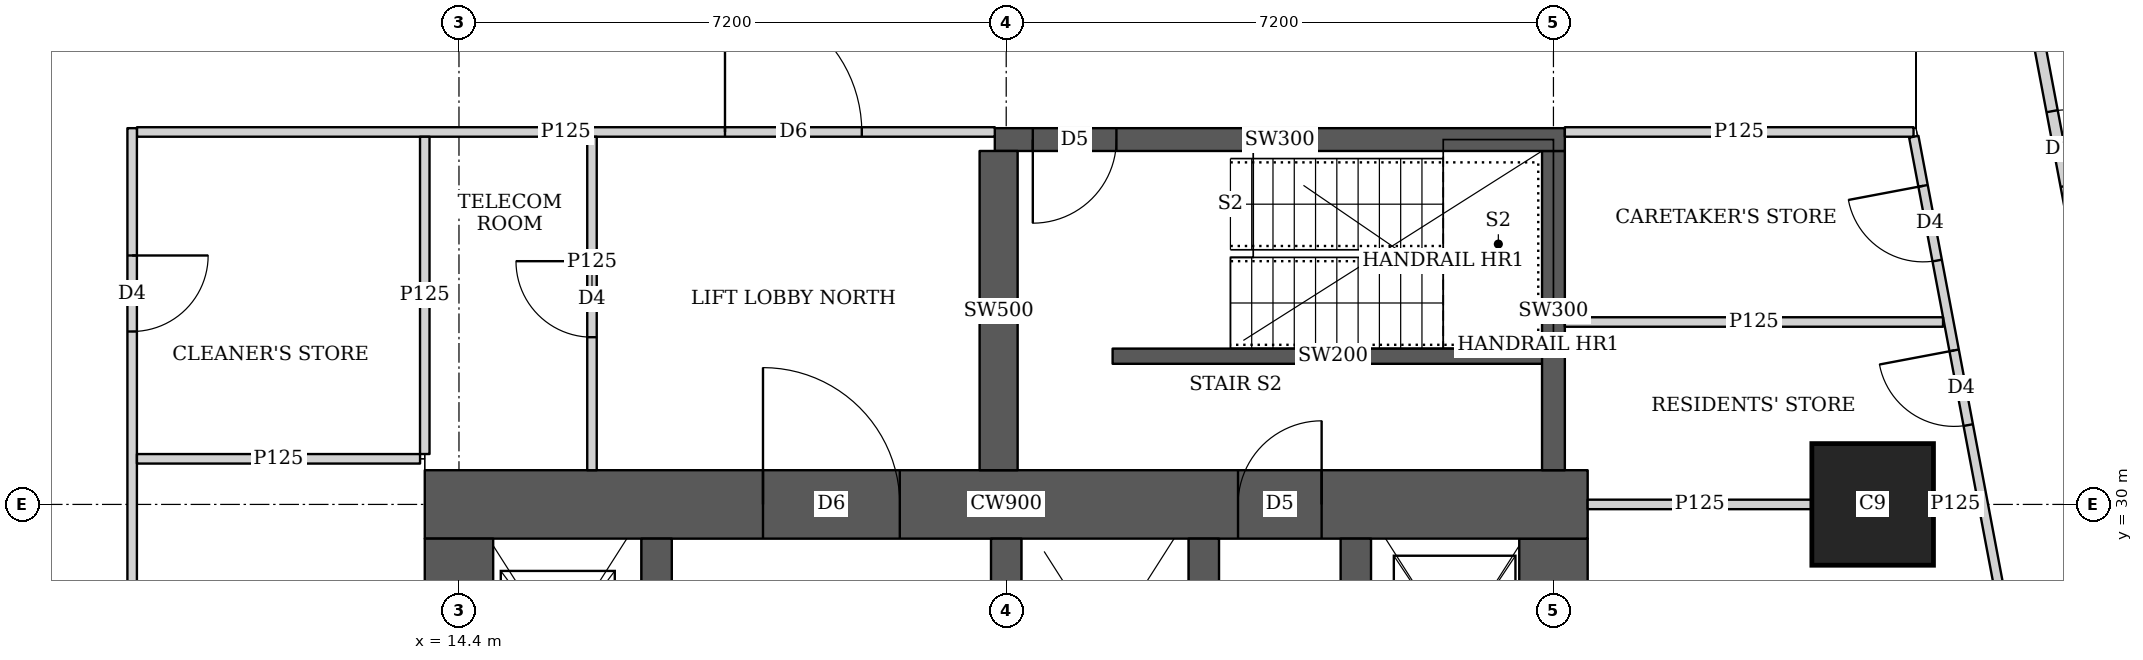
"""IFC4 building model, lengths in metres.
Left out: names, types, materials, properties, quantities, classifications, styles, units other than length and angle.
Written with IfcOpenShell. Run it as: python <this file> out.ifc"""

import sys

from ifc_helpers import new_model, si_unit, direction, frame, frame_2d, origin, origin_2d, place, context, subcontext, project, spatial, rectangle, extrude, element, fill, save


model = new_model("IFC4")
c1 = context("Model", 3, precision=1e-05, world=origin(), true_north=direction((0.0, 1.0)))
c2 = subcontext(c1, "Body", "Model", "MODEL_VIEW")
j1 = project(units=[si_unit("LENGTHUNIT", "METRE"), si_unit("PLANEANGLEUNIT", "RADIAN")], contexts=[c1])
p1 = place(None, origin())
s1 = spatial("IfcSite", under=j1, at=p1, CompositionType="ELEMENT")
p2 = place(p1, origin())
s2 = spatial("IfcBuilding", under=s1, at=p2, CompositionType="ELEMENT")
p3 = place(p2, frame((0.0, 0.0, 122.9)))
s3 = spatial("IfcBuildingStorey", under=s2, at=p3, CompositionType="ELEMENT", Elevation=122.9)
p4 = place(p3, frame((33.0, 30.0, 0.0), z_axis=(0.0, 0.0, 1.0), x_axis=(1.0, 0.0, 0.0)))
e1 = element("IfcColumn", 1, at=p4, inside=s3, PredefinedType="COLUMN", context=c2, shape_type="SweptSolid", body=[
    extrude(rectangle(XDim=1.6, YDim=1.6, at=origin_2d()), origin(), (0.0, 0.0, 1.0), 3.75),
])
p5 = place(p3, frame((13.95, 30.0, 0.0), z_axis=(0.0, 0.0, 1.0), x_axis=(1.0, 0.0, 0.0)))
e2 = element("IfcWall", 2, at=p5, inside=s3, PredefinedType="SHEAR", context=c2, shape_type="SweptSolid", body=[
    extrude(rectangle(XDim=15.3, YDim=0.9, at=frame_2d((7.65, 0.0))), origin(), (0.0, 0.0, 1.0), 3.75),
])
p6 = place(p5, frame((4.45, 0.0, 0.0)))
e3 = element("IfcOpeningElement", 3, at=p6, cuts=e2, PredefinedType="OPENING", context=c2, shape_type="SweptSolid", body=[
    extrude(rectangle(XDim=1.8, YDim=2.1, at=frame_2d((0.9, 1.05))), frame((0.0, 0.46, 0.0), z_axis=(0.0, -1.0, 0.0), x_axis=(1.0, 0.0, 0.0)), (0.0, 0.0, 1.0), 0.92),
])
p7 = place(p5, frame((10.7, 0.0, 0.0)))
e4 = element("IfcOpeningElement", 4, at=p7, cuts=e2, PredefinedType="OPENING", context=c2, shape_type="SweptSolid", body=[
    extrude(rectangle(XDim=1.1, YDim=2.1, at=frame_2d((0.55, 1.05))), frame((0.0, 0.46, 0.0), z_axis=(0.0, -1.0, 0.0), x_axis=(1.0, 0.0, 0.0)), (0.0, 0.0, 1.0), 0.92),
])
for number, where, z_axis, x_axis in (
    (5, (14.4, 15.45, 0.0), (0.0, 0.0, 1.0), (0.0, 1.0, 0.0)),
    (6, (28.8, 15.45, 0.0), (0.0, 0.0, 1.0), (0.0, 1.0, 0.0)),
):
    element("IfcWall", number, at=place(p3, frame(where, z_axis=z_axis, x_axis=x_axis)), inside=s3, PredefinedType="SHEAR", context=c2, shape_type="SweptSolid", body=[
        extrude(rectangle(XDim=14.1, YDim=0.9, at=frame_2d((7.05, 0.0))), origin(), (0.0, 0.0, 1.0), 3.75),
    ])
p8 = place(p3, frame((17.0, 15.45, 0.0), z_axis=(0.0, 0.0, 1.0), x_axis=(0.0, 1.0, 0.0)))
e7 = element("IfcWall", 7, at=p8, inside=s3, PredefinedType="SHEAR", context=c2, shape_type="SweptSolid", body=[
    extrude(rectangle(XDim=14.1, YDim=0.4, at=frame_2d((7.05, 0.0))), origin(), (0.0, 0.0, 1.0), 3.75),
])
p9 = place(p8, frame((0.875, 0.0, 0.0)))
e8 = element("IfcOpeningElement", 8, at=p9, cuts=e7, PredefinedType="OPENING", context=c2, shape_type="SweptSolid", body=[
    extrude(rectangle(XDim=1.1, YDim=2.1, at=frame_2d((0.55, 1.05))), frame((0.0, 0.21, 0.0), z_axis=(0.0, -1.0, 0.0), x_axis=(1.0, 0.0, 0.0)), (0.0, 0.0, 1.0), 0.42),
])
p10 = place(p8, frame((4.625, 0.0, 0.0)))
e9 = element("IfcOpeningElement", 9, at=p10, cuts=e7, PredefinedType="OPENING", context=c2, shape_type="SweptSolid", body=[
    extrude(rectangle(XDim=1.1, YDim=2.1, at=frame_2d((0.55, 1.05))), frame((0.0, 0.21, 0.0), z_axis=(0.0, -1.0, 0.0), x_axis=(1.0, 0.0, 0.0)), (0.0, 0.0, 1.0), 0.42),
])
p11 = place(p8, frame((8.375, 0.0, 0.0)))
e10 = element("IfcOpeningElement", 10, at=p11, cuts=e7, PredefinedType="OPENING", context=c2, shape_type="SweptSolid", body=[
    extrude(rectangle(XDim=1.1, YDim=2.1, at=frame_2d((0.55, 1.05))), frame((0.0, 0.21, 0.0), z_axis=(0.0, -1.0, 0.0), x_axis=(1.0, 0.0, 0.0)), (0.0, 0.0, 1.0), 0.42),
])
p12 = place(p8, frame((12.125, 0.0, 0.0)))
e11 = element("IfcOpeningElement", 11, at=p12, cuts=e7, PredefinedType="OPENING", context=c2, shape_type="SweptSolid", body=[
    extrude(rectangle(XDim=1.1, YDim=2.1, at=frame_2d((0.55, 1.05))), frame((0.0, 0.21, 0.0), z_axis=(0.0, -1.0, 0.0), x_axis=(1.0, 0.0, 0.0)), (0.0, 0.0, 1.0), 0.42),
])
for number, where, z_axis, x_axis in (
    (12, (21.6, 15.45, 0.0), (0.0, 0.0, 1.0), (0.0, 1.0, 0.0)),
    (13, (24.2, 15.45, 0.0), (0.0, 0.0, 1.0), (0.0, 1.0, 0.0)),
):
    element("IfcWall", number, at=place(p3, frame(where, z_axis=z_axis, x_axis=x_axis)), inside=s3, PredefinedType="SHEAR", context=c2, shape_type="SweptSolid", body=[
        extrude(rectangle(XDim=14.1, YDim=0.4, at=frame_2d((7.05, 0.0))), origin(), (0.0, 0.0, 1.0), 3.75),
    ])
p13 = place(p3, frame((26.2, 26.45, 0.0), z_axis=(0.0, 0.0, 1.0), x_axis=(0.0, 1.0, 0.0)))
e14 = element("IfcWall", 14, at=p13, inside=s3, PredefinedType="SHEAR", context=c2, shape_type="SweptSolid", body=[
    extrude(rectangle(XDim=3.1, YDim=0.4, at=frame_2d((1.55, 0.0))), origin(), (0.0, 0.0, 1.0), 3.75),
])
p14 = place(p13, frame((1.075, 0.0, 0.0)))
e15 = element("IfcOpeningElement", 15, at=p14, cuts=e14, PredefinedType="OPENING", context=c2, shape_type="SweptSolid", body=[
    extrude(rectangle(XDim=1.2, YDim=2.1, at=frame_2d((0.6, 1.05))), frame((0.0, 0.21, 0.0), z_axis=(0.0, -1.0, 0.0), x_axis=(1.0, 0.0, 0.0)), (0.0, 0.0, 1.0), 0.42),
])
p15 = place(p3, frame((21.45, 34.8, 0.0), z_axis=(0.0, 0.0, 1.0), x_axis=(1.0, 0.0, 0.0)))
e16 = element("IfcWall", 16, at=p15, inside=s3, PredefinedType="SHEAR", context=c2, shape_type="SweptSolid", body=[
    extrude(rectangle(XDim=7.5, YDim=0.3, at=frame_2d((3.75, 0.0))), origin(), (0.0, 0.0, 1.0), 3.75),
])
p16 = place(p15, frame((0.5, 0.0, 0.0)))
e17 = element("IfcOpeningElement", 17, at=p16, cuts=e16, PredefinedType="OPENING", context=c2, shape_type="SweptSolid", body=[
    extrude(rectangle(XDim=1.1, YDim=2.1, at=frame_2d((0.55, 1.05))), frame((0.0, 0.16, 0.0), z_axis=(0.0, -1.0, 0.0), x_axis=(1.0, 0.0, 0.0)), (0.0, 0.0, 1.0), 0.32),
])
p17 = place(p3, frame((21.5, 30.45, 0.0), z_axis=(0.0, 0.0, 1.0), x_axis=(0.0, 1.0, 0.0)))
e18 = element("IfcWall", 18, at=p17, inside=s3, PredefinedType="SHEAR", context=c2, shape_type="SweptSolid", body=[
    extrude(rectangle(XDim=4.2, YDim=0.5, at=frame_2d((2.1, 0.0))), origin(), (0.0, 0.0, 1.0), 3.75),
])
p18 = place(p3, frame((28.8, 30.45, 0.0), z_axis=(0.0, 0.0, 1.0), x_axis=(0.0, 1.0, 0.0)))
e19 = element("IfcWall", 19, at=p18, inside=s3, PredefinedType="SHEAR", context=c2, shape_type="SweptSolid", body=[
    extrude(rectangle(XDim=4.2, YDim=0.3, at=frame_2d((2.1, 0.0))), origin(), (0.0, 0.0, 1.0), 3.75),
])
p19 = place(p3, frame((33.382, 45.65, 0.0), z_axis=(0.0, 0.0, 1.0), x_axis=(0.185593544777, -0.982626600565, 0.0)))
e20 = element("IfcWall", 20, at=p19, inside=s3, PredefinedType="SOLIDWALL", context=c2, shape_type="SweptSolid", body=[
    extrude(rectangle(XDim=47.118, YDim=0.15, at=frame_2d((23.559, 0.0))), origin(), (0.0, 0.0, 1.0), 2.2),
])
p20 = place(p19, frame((10.662, 0.0, 0.0)))
e21 = element("IfcOpeningElement", 21, at=p20, cuts=e20, PredefinedType="OPENING", context=c2, shape_type="SweptSolid", body=[
    extrude(rectangle(XDim=1.0, YDim=2.1, at=frame_2d((0.5, 1.05))), frame((0.0, 0.085, 0.0), z_axis=(0.0, -1.0, 0.0), x_axis=(1.0, 0.0, 0.0)), (0.0, 0.0, 1.0), 0.17),
])
p21 = place(p19, frame((15.237, 0.0, 0.0)))
e22 = element("IfcOpeningElement", 22, at=p21, cuts=e20, PredefinedType="OPENING", context=c2, shape_type="SweptSolid", body=[
    extrude(rectangle(XDim=1.0, YDim=2.1, at=frame_2d((0.5, 1.05))), frame((0.0, 0.085, 0.0), z_axis=(0.0, -1.0, 0.0), x_axis=(1.0, 0.0, 0.0)), (0.0, 0.0, 1.0), 0.17),
])
p22 = place(p19, frame((22.87, 0.0, 0.0)))
e23 = element("IfcOpeningElement", 23, at=p22, cuts=e20, PredefinedType="OPENING", context=c2, shape_type="SweptSolid", body=[
    extrude(rectangle(XDim=1.0, YDim=2.1, at=frame_2d((0.5, 1.05))), frame((0.0, 0.085, 0.0), z_axis=(0.0, -1.0, 0.0), x_axis=(1.0, 0.0, 0.0)), (0.0, 0.0, 1.0), 0.17),
])
p23 = place(p19, frame((33.833, 0.0, 0.0)))
e24 = element("IfcOpeningElement", 24, at=p23, cuts=e20, PredefinedType="OPENING", context=c2, shape_type="SweptSolid", body=[
    extrude(rectangle(XDim=1.0, YDim=2.1, at=frame_2d((0.5, 1.05))), frame((0.0, 0.085, 0.0), z_axis=(0.0, -1.0, 0.0), x_axis=(1.0, 0.0, 0.0)), (0.0, 0.0, 1.0), 0.17),
])
p24 = place(p3, frame((10.1, 10.05, 0.0), z_axis=(0.0, 0.0, 1.0), x_axis=(0.0, 1.0, 0.0)))
e25 = element("IfcWall", 25, at=p24, inside=s3, PredefinedType="PARTITIONING", context=c2, shape_type="SweptSolid", body=[
    extrude(rectangle(XDim=24.9, YDim=0.125, at=frame_2d((12.45, 0.0))), origin(), (0.0, 0.0, 1.0), 3.5),
])
p25 = place(p24, frame((1.675, 0.0, 0.0)))
e26 = element("IfcOpeningElement", 26, at=p25, cuts=e25, PredefinedType="OPENING", context=c2, shape_type="SweptSolid", body=[
    extrude(rectangle(XDim=1.0, YDim=2.1, at=frame_2d((0.5, 1.05))), frame((0.0, 0.073, 0.0), z_axis=(0.0, -1.0, 0.0), x_axis=(1.0, 0.0, 0.0)), (0.0, 0.0, 1.0), 0.145),
])
p26 = place(p24, frame((7.9, 0.0, 0.0)))
e27 = element("IfcOpeningElement", 27, at=p26, cuts=e25, PredefinedType="OPENING", context=c2, shape_type="SweptSolid", body=[
    extrude(rectangle(XDim=1.0, YDim=2.1, at=frame_2d((0.5, 1.05))), frame((0.0, 0.073, 0.0), z_axis=(0.0, -1.0, 0.0), x_axis=(1.0, 0.0, 0.0)), (0.0, 0.0, 1.0), 0.145),
])
p27 = place(p24, frame((16.0, 0.0, 0.0)))
e28 = element("IfcOpeningElement", 28, at=p27, cuts=e25, PredefinedType="OPENING", context=c2, shape_type="SweptSolid", body=[
    extrude(rectangle(XDim=1.0, YDim=2.1, at=frame_2d((0.5, 1.05))), frame((0.0, 0.073, 0.0), z_axis=(0.0, -1.0, 0.0), x_axis=(1.0, 0.0, 0.0)), (0.0, 0.0, 1.0), 0.145),
])
p28 = place(p24, frame((22.225, 0.0, 0.0)))
e29 = element("IfcOpeningElement", 29, at=p28, cuts=e25, PredefinedType="OPENING", context=c2, shape_type="SweptSolid", body=[
    extrude(rectangle(XDim=1.0, YDim=2.1, at=frame_2d((0.5, 1.05))), frame((0.0, 0.073, 0.0), z_axis=(0.0, -1.0, 0.0), x_axis=(1.0, 0.0, 0.0)), (0.0, 0.0, 1.0), 0.145),
])
p29 = place(p3, frame((10.163, 30.6, 0.0), z_axis=(0.0, 0.0, 1.0), x_axis=(1.0, 0.0, 0.0)))
e30 = element("IfcWall", 30, at=p29, inside=s3, PredefinedType="PARTITIONING", context=c2, shape_type="SweptSolid", body=[
    extrude(rectangle(XDim=3.725, YDim=0.125, at=frame_2d((1.862, 0.0))), origin(), (0.0, 0.0, 1.0), 3.5),
])
p30 = place(p3, frame((13.95, 30.663, 0.0), z_axis=(0.0, 0.0, 1.0), x_axis=(0.0, 1.0, 0.0)))
e31 = element("IfcWall", 31, at=p30, inside=s3, PredefinedType="PARTITIONING", context=c2, shape_type="SweptSolid", body=[
    extrude(rectangle(XDim=4.174, YDim=0.125, at=frame_2d((2.087, 0.0))), origin(), (0.0, 0.0, 1.0), 3.5),
])
p31 = place(p3, frame((10.163, 34.9, 0.0), z_axis=(0.0, 0.0, 1.0), x_axis=(1.0, 0.0, 0.0)))
e32 = element("IfcWall", 32, at=p31, inside=s3, PredefinedType="PARTITIONING", context=c2, shape_type="SweptSolid", body=[
    extrude(rectangle(XDim=11.287, YDim=0.125, at=frame_2d((5.644, 0.0))), origin(), (0.0, 0.0, 1.0), 3.5),
])
p32 = place(p31, frame((7.737, 0.0, 0.0)))
e33 = element("IfcOpeningElement", 33, at=p32, cuts=e32, PredefinedType="OPENING", context=c2, shape_type="SweptSolid", body=[
    extrude(rectangle(XDim=1.8, YDim=2.1, at=frame_2d((0.9, 1.05))), frame((0.0, 0.073, 0.0), z_axis=(0.0, -1.0, 0.0), x_axis=(1.0, 0.0, 0.0)), (0.0, 0.0, 1.0), 0.145),
])
p33 = place(p3, frame((16.15, 30.45, 0.0), z_axis=(0.0, 0.0, 1.0), x_axis=(0.0, 1.0, 0.0)))
e34 = element("IfcWall", 34, at=p33, inside=s3, PredefinedType="PARTITIONING", context=c2, shape_type="SweptSolid", body=[
    extrude(rectangle(XDim=4.387, YDim=0.125, at=frame_2d((2.193, 0.0))), origin(), (0.0, 0.0, 1.0), 3.5),
])
p34 = place(p33, frame((1.75, 0.0, 0.0)))
e35 = element("IfcOpeningElement", 35, at=p34, cuts=e34, PredefinedType="OPENING", context=c2, shape_type="SweptSolid", body=[
    extrude(rectangle(XDim=1.0, YDim=2.1, at=frame_2d((0.5, 1.05))), frame((0.0, 0.073, 0.0), z_axis=(0.0, -1.0, 0.0), x_axis=(1.0, 0.0, 0.0)), (0.0, 0.0, 1.0), 0.145),
])
p35 = place(p3, frame((28.95, 34.9, 0.0), z_axis=(0.0, 0.0, 1.0), x_axis=(1.0, 0.0, 0.0)))
e36 = element("IfcWall", 36, at=p35, inside=s3, PredefinedType="PARTITIONING", context=c2, shape_type="SweptSolid", body=[
    extrude(rectangle(XDim=4.588, YDim=0.125, at=frame_2d((2.294, 0.0))), origin(), (0.0, 0.0, 1.0), 3.5),
])
p36 = place(p3, frame((38.202, 10.163, 0.0), z_axis=(0.0, 0.0, 1.0), x_axis=(-0.185610321132, 0.982623431783, 0.0)))
e37 = element("IfcWall", 37, at=p36, inside=s3, PredefinedType="PARTITIONING", context=c2, shape_type="SweptSolid", body=[
    extrude(rectangle(XDim=25.111, YDim=0.125, at=frame_2d((12.556, 0.0))), origin(), (0.0, 0.0, 1.0), 2.5),
])
p37 = place(p36, frame((0.708, 0.0, 0.0)))
e38 = element("IfcOpeningElement", 38, at=p37, cuts=e37, PredefinedType="OPENING", context=c2, shape_type="SweptSolid", body=[
    extrude(rectangle(XDim=1.0, YDim=2.1, at=frame_2d((0.5, 1.05))), frame((0.0, 0.073, 0.0), z_axis=(0.0, -1.0, 0.0), x_axis=(1.0, 0.0, 0.0)), (0.0, 0.0, 1.0), 0.145),
])
p38 = place(p36, frame((13.378, 0.0, 0.0)))
e39 = element("IfcOpeningElement", 39, at=p38, cuts=e37, PredefinedType="OPENING", context=c2, shape_type="SweptSolid", body=[
    extrude(rectangle(XDim=1.0, YDim=2.1, at=frame_2d((0.5, 1.05))), frame((0.0, 0.073, 0.0), z_axis=(0.0, -1.0, 0.0), x_axis=(1.0, 0.0, 0.0)), (0.0, 0.0, 1.0), 0.145),
])
p39 = place(p36, frame((21.25, 0.0, 0.0)))
e40 = element("IfcOpeningElement", 40, at=p39, cuts=e37, PredefinedType="OPENING", context=c2, shape_type="SweptSolid", body=[
    extrude(rectangle(XDim=1.0, YDim=2.1, at=frame_2d((0.5, 1.05))), frame((0.0, 0.073, 0.0), z_axis=(0.0, -1.0, 0.0), x_axis=(1.0, 0.0, 0.0)), (0.0, 0.0, 1.0), 0.145),
])
p40 = place(p36, frame((23.453, 0.0, 0.0)))
e41 = element("IfcOpeningElement", 41, at=p40, cuts=e37, PredefinedType="OPENING", context=c2, shape_type="SweptSolid", body=[
    extrude(rectangle(XDim=1.0, YDim=2.1, at=frame_2d((0.5, 1.05))), frame((0.0, 0.073, 0.0), z_axis=(0.0, -1.0, 0.0), x_axis=(1.0, 0.0, 0.0)), (0.0, 0.0, 1.0), 0.145),
])
p41 = place(p3, frame((29.25, 30.0, 0.0), z_axis=(0.0, 0.0, 1.0), x_axis=(1.0, 0.0, 0.0)))
e42 = element("IfcWall", 42, at=p41, inside=s3, PredefinedType="PARTITIONING", context=c2, shape_type="SweptSolid", body=[
    extrude(rectangle(XDim=2.949, YDim=0.125, at=frame_2d((1.475, 0.0))), origin(), (0.0, 0.0, 1.0), 3.5),
])
p42 = place(p3, frame((33.801, 30.0, 0.0), z_axis=(0.0, 0.0, 1.0), x_axis=(1.0, 0.0, 0.0)))
e43 = element("IfcWall", 43, at=p42, inside=s3, PredefinedType="PARTITIONING", context=c2, shape_type="SweptSolid", body=[
    extrude(rectangle(XDim=0.578, YDim=0.125, at=frame_2d((0.289, 0.0))), origin(), (0.0, 0.0, 1.0), 2.5),
])
p43 = place(p3, frame((28.95, 32.4, 0.0), z_axis=(0.0, 0.0, 1.0), x_axis=(1.0, 0.0, 0.0)))
e44 = element("IfcWall", 44, at=p43, inside=s3, PredefinedType="PARTITIONING", context=c2, shape_type="SweptSolid", body=[
    extrude(rectangle(XDim=4.976, YDim=0.125, at=frame_2d((2.488, 0.0))), origin(), (0.0, 0.0, 1.0), 3.5),
])
p44 = place(p3, frame((23.0, 31.95, 0.0), z_axis=(0.0, 0.0, 1.0), x_axis=(1.0, 0.0, 0.0)))
e45 = element("IfcWall", 45, at=p44, inside=s3, PredefinedType="SHEAR", context=c2, shape_type="SweptSolid", body=[
    extrude(rectangle(XDim=5.8, YDim=0.2, at=frame_2d((2.9, 0.0))), origin(), (0.0, 0.0, 1.0), 3.75),
])
p45 = place(p20, origin())
e46 = element("IfcDoor", 46, at=p45, inside=s3, OperationType="SINGLE_SWING_RIGHT", PredefinedType="DOOR", context=c2, shape_type="SweptSolid", body=[
    extrude(rectangle(XDim=1.0, YDim=2.1, at=frame_2d((0.5, 1.05))), frame((0.0, 0.025, 0.0), z_axis=(0.0, -1.0, 0.0), x_axis=(1.0, 0.0, 0.0)), (0.0, 0.0, 1.0), 0.05),
])
fill(e21, e46)
p46 = place(p28, origin())
e47 = element("IfcDoor", 47, at=p46, inside=s3, OperationType="SINGLE_SWING_LEFT", PredefinedType="DOOR", context=c2, shape_type="SweptSolid", body=[
    extrude(rectangle(XDim=1.0, YDim=2.1, at=frame_2d((0.5, 1.05))), frame((0.0, 0.025, 0.0), z_axis=(0.0, -1.0, 0.0), x_axis=(1.0, 0.0, 0.0)), (0.0, 0.0, 1.0), 0.05),
])
fill(e29, e47)
p47 = place(p34, origin())
e48 = element("IfcDoor", 48, at=p47, inside=s3, OperationType="SINGLE_SWING_RIGHT", PredefinedType="DOOR", context=c2, shape_type="SweptSolid", body=[
    extrude(rectangle(XDim=1.0, YDim=2.1, at=frame_2d((0.5, 1.05))), frame((0.0, 0.025, 0.0), z_axis=(0.0, -1.0, 0.0), x_axis=(1.0, 0.0, 0.0)), (0.0, 0.0, 1.0), 0.05),
])
fill(e35, e48)
p48 = place(p32, origin())
e49 = element("IfcDoor", 49, at=p48, inside=s3, OperationType="DOUBLE_DOOR_SINGLE_SWING", PredefinedType="DOOR", context=c2, shape_type="SweptSolid", body=[
    extrude(rectangle(XDim=1.8, YDim=2.1, at=frame_2d((0.9, 1.05))), frame((0.0, 0.025, 0.0), z_axis=(0.0, -1.0, 0.0), x_axis=(1.0, 0.0, 0.0)), (0.0, 0.0, 1.0), 0.05),
])
fill(e33, e49)
p49 = place(p39, origin())
e50 = element("IfcDoor", 50, at=p49, inside=s3, OperationType="SINGLE_SWING_RIGHT", PredefinedType="DOOR", context=c2, shape_type="SweptSolid", body=[
    extrude(rectangle(XDim=1.0, YDim=2.1, at=frame_2d((0.5, 1.05))), frame((0.0, 0.025, 0.0), z_axis=(0.0, -1.0, 0.0), x_axis=(1.0, 0.0, 0.0)), (0.0, 0.0, 1.0), 0.05),
])
fill(e40, e50)
p50 = place(p40, origin())
e51 = element("IfcDoor", 51, at=p50, inside=s3, OperationType="SINGLE_SWING_RIGHT", PredefinedType="DOOR", context=c2, shape_type="SweptSolid", body=[
    extrude(rectangle(XDim=1.0, YDim=2.1, at=frame_2d((0.5, 1.05))), frame((0.0, 0.025, 0.0), z_axis=(0.0, -1.0, 0.0), x_axis=(1.0, 0.0, 0.0)), (0.0, 0.0, 1.0), 0.05),
])
fill(e41, e51)
p51 = place(p6, origin())
e52 = element("IfcDoor", 52, at=p51, inside=s3, OperationType="DOUBLE_DOOR_SINGLE_SWING", PredefinedType="DOOR", context=c2, shape_type="SweptSolid", body=[
    extrude(rectangle(XDim=1.8, YDim=2.1, at=frame_2d((0.9, 1.05))), frame((0.0, 0.025, 0.0), z_axis=(0.0, -1.0, 0.0), x_axis=(1.0, 0.0, 0.0)), (0.0, 0.0, 1.0), 0.05),
])
fill(e3, e52)
p52 = place(p7, origin())
e53 = element("IfcDoor", 53, at=p52, inside=s3, OperationType="SINGLE_SWING_RIGHT", PredefinedType="DOOR", context=c2, shape_type="SweptSolid", body=[
    extrude(rectangle(XDim=1.1, YDim=2.1, at=frame_2d((0.55, 1.05))), frame((0.0, 0.025, 0.0), z_axis=(0.0, -1.0, 0.0), x_axis=(1.0, 0.0, 0.0)), (0.0, 0.0, 1.0), 0.05),
])
fill(e4, e53)
p53 = place(p16, origin())
e54 = element("IfcDoor", 54, at=p53, inside=s3, OperationType="SINGLE_SWING_RIGHT", PredefinedType="DOOR", context=c2, shape_type="SweptSolid", body=[
    extrude(rectangle(XDim=1.1, YDim=2.1, at=frame_2d((0.55, 1.05))), frame((0.0, 0.025, 0.0), z_axis=(0.0, -1.0, 0.0), x_axis=(1.0, 0.0, 0.0)), (0.0, 0.0, 1.0), 0.05),
])
fill(e17, e54)
save(model, sys.argv[1])
